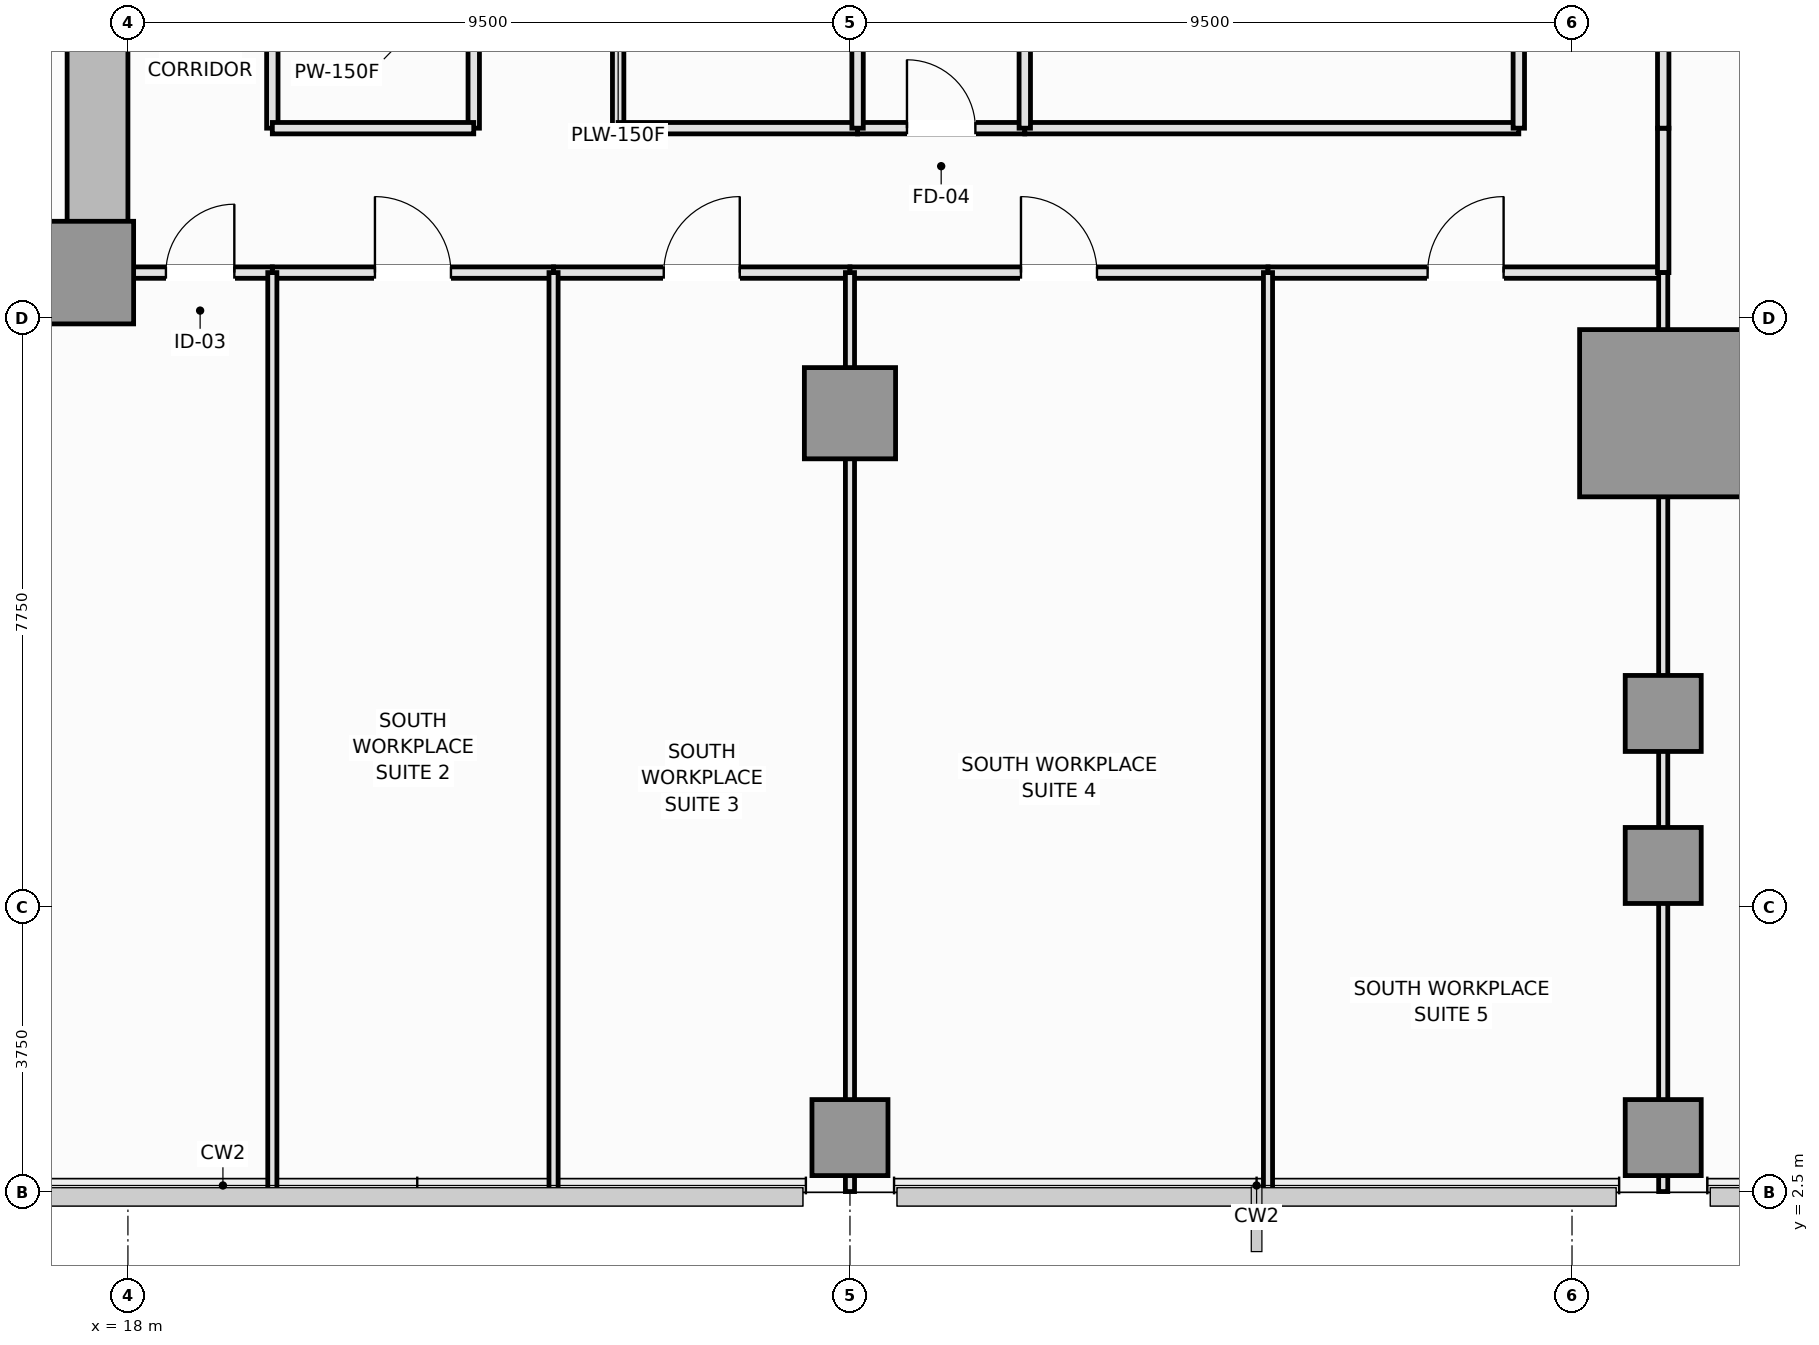
"""IFC4 building model, lengths in metres.
Left out: names, types, materials, properties, quantities, classifications, styles, units other than length and angle.
Written with IfcOpenShell. Run it as: python <this file> out.ifc"""

import sys

from ifc_helpers import new_model, si_unit, direction, frame, frame_2d, origin, origin_2d, place, context, subcontext, project, spatial, rectangle, extrude, element, fill, save


model = new_model("IFC4")
c1 = context("Model", 3, precision=1e-05, world=origin(), true_north=direction((0.0, 1.0)))
c2 = subcontext(c1, "Body", "Model", "MODEL_VIEW")
j1 = project(units=[si_unit("LENGTHUNIT", "METRE"), si_unit("PLANEANGLEUNIT", "RADIAN")], contexts=[c1])
p1 = place(None, origin())
s1 = spatial("IfcSite", under=j1, at=p1, CompositionType="ELEMENT")
p2 = place(p1, origin())
s2 = spatial("IfcBuilding", under=s1, at=p2, CompositionType="ELEMENT")
p3 = place(p2, frame((0.0, 0.0, 64.65)))
s3 = spatial("IfcBuildingStorey", under=s2, at=p3, CompositionType="ELEMENT", Elevation=64.65)
p4 = place(p3, frame((4.5, 14.4, 0.0), z_axis=(0.0, 0.0, 1.0), x_axis=(1.0, 0.0, 0.0)))
e1 = element("IfcWall", 1, at=p4, inside=s3, PredefinedType="SHEAR", context=c2, shape_type="SweptSolid", body=[
    extrude(rectangle(XDim=13.5, YDim=0.8, at=frame_2d((6.75, 0.0))), origin(), (0.0, 0.0, 1.0), 3.55),
])
p5 = place(p3, frame((17.6, 14.8, 0.0), z_axis=(0.0, 0.0, 1.0), x_axis=(0.0, 1.0, 0.0)))
e2 = element("IfcWall", 2, at=p5, inside=s3, PredefinedType="SHEAR", context=c2, shape_type="SweptSolid", body=[
    extrude(rectangle(XDim=8.65, YDim=0.8, at=frame_2d((4.325, 0.0))), origin(), (0.0, 0.0, 1.0), 3.55),
])
p6 = place(p5, frame((4.1, 0.0, 0.0)))
e3 = element("IfcOpeningElement", 3, at=p6, cuts=e2, PredefinedType="OPENING", context=c2, shape_type="SweptSolid", body=[
    extrude(rectangle(XDim=1.1, YDim=2.15, at=frame_2d((0.55, 1.075))), frame((0.0, 0.41, 0.0), z_axis=(0.0, -1.0, 0.0), x_axis=(1.0, 0.0, 0.0)), (0.0, 0.0, 1.0), 0.82),
])
p7 = place(p3, frame((17.4, 14.6, 0.0), z_axis=(0.0, 0.0, 1.0), x_axis=(1.0, 0.0, 0.0)))
e4 = element("IfcColumn", 4, at=p7, inside=s3, PredefinedType="PILASTER", context=c2, shape_type="SweptSolid", body=[
    extrude(rectangle(XDim=1.35, YDim=1.35, at=origin_2d()), origin(), (0.0, 0.0, 1.0), 3.55),
])
p8 = place(p3, frame((38.2, 12.75, 0.0), z_axis=(0.0, 0.0, 1.0), x_axis=(1.0, 0.0, 0.0)))
e5 = element("IfcColumn", 5, at=p8, inside=s3, PredefinedType="COLUMN", context=c2, shape_type="SweptSolid", body=[
    extrude(rectangle(XDim=2.2, YDim=2.2, at=origin_2d()), origin(), (0.0, 0.0, 1.0), 3.55),
])
p9 = place(p3, frame((27.5, 12.75, 0.0), z_axis=(0.0, 0.0, 1.0), x_axis=(1.0, 0.0, 0.0)))
e6 = element("IfcColumn", 6, at=p9, inside=s3, PredefinedType="COLUMN", context=c2, shape_type="SweptSolid", body=[
    extrude(rectangle(XDim=1.2, YDim=1.2, at=origin_2d()), origin(), (0.0, 0.0, 1.0), 3.55),
])
for number, where, z_axis, x_axis in (
    (7, (38.2, 6.8, 0.0), (0.0, 0.0, 1.0), (1.0, 0.0, 0.0)),
    (8, (38.2, 8.8, 0.0), (0.0, 0.0, 1.0), (1.0, 0.0, 0.0)),
    (9, (27.5, 3.22, 0.0), (0.0, 0.0, 1.0), (1.0, 0.0, 0.0)),
    (10, (38.2, 3.22, 0.0), (0.0, 0.0, 1.0), (1.0, 0.0, 0.0)),
):
    element("IfcColumn", number, at=place(p3, frame(where, z_axis=z_axis, x_axis=x_axis)), inside=s3, PredefinedType="COLUMN", context=c2, shape_type="SweptSolid", body=[
        extrude(rectangle(XDim=1.0, YDim=1.0, at=origin_2d()), origin(), (0.0, 0.0, 1.0), 3.55),
    ])
p10 = place(p3, frame((22.55, 16.5, 0.0), z_axis=(0.0, 0.0, 1.0), x_axis=(0.0, 1.0, 0.0)))
e11 = element("IfcWall", 11, at=p10, inside=s3, PredefinedType="PARTITIONING", context=c2, shape_type="SweptSolid", body=[
    extrude(rectangle(XDim=4.25, YDim=0.15, at=frame_2d((2.125, 0.0))), origin(), (0.0, 0.0, 1.0), 3.01),
])
p11 = place(p10, frame((1.625, 0.0, 0.0)))
e12 = element("IfcOpeningElement", 12, at=p11, cuts=e11, PredefinedType="OPENING", context=c2, shape_type="SweptSolid", body=[
    extrude(rectangle(XDim=1.0, YDim=2.15, at=frame_2d((0.5, 1.075))), frame((0.0, 0.085, 0.0), z_axis=(0.0, -1.0, 0.0), x_axis=(1.0, 0.0, 0.0)), (0.0, 0.0, 1.0), 0.17),
])
p12 = place(p3, frame((24.45, 16.5, 0.0), z_axis=(0.0, 0.0, 1.0), x_axis=(0.0, 1.0, 0.0)))
e13 = element("IfcWall", 13, at=p12, inside=s3, PredefinedType="PLUMBINGWALL", context=c2, shape_type="SweptSolid", body=[
    extrude(rectangle(XDim=3.1, YDim=0.15, at=frame_2d((1.55, 0.0))), origin(), (0.0, 0.0, 1.0), 3.37),
])
p13 = place(p12, frame((1.1, 0.0, 0.0)))
e14 = element("IfcOpeningElement", 14, at=p13, cuts=e13, PredefinedType="OPENING", context=c2, shape_type="SweptSolid", body=[
    extrude(rectangle(XDim=0.9, YDim=2.1, at=frame_2d((0.45, 1.05))), frame((0.0, 0.085, 0.0), z_axis=(0.0, -1.0, 0.0), x_axis=(1.0, 0.0, 0.0)), (0.0, 0.0, 1.0), 0.17),
])
p14 = place(p3, frame((19.9, 16.5, 0.0), z_axis=(0.0, 0.0, 1.0), x_axis=(0.0, 1.0, 0.0)))
e15 = element("IfcWall", 15, at=p14, inside=s3, PredefinedType="PARTITIONING", context=c2, shape_type="SweptSolid", body=[
    extrude(rectangle(XDim=4.25, YDim=0.15, at=frame_2d((2.125, 0.0))), origin(), (0.0, 0.0, 1.0), 3.37),
])
p15 = place(p3, frame((19.9, 16.5, 0.0), z_axis=(0.0, 0.0, 1.0), x_axis=(1.0, 0.0, 0.0)))
e16 = element("IfcWall", 16, at=p15, inside=s3, PredefinedType="PARTITIONING", context=c2, shape_type="SweptSolid", body=[
    extrude(rectangle(XDim=2.65, YDim=0.15, at=frame_2d((1.325, 0.0))), origin(), (0.0, 0.0, 1.0), 3.37),
])
p16 = place(p3, frame((24.45, 16.5, 0.0), z_axis=(0.0, 0.0, 1.0), x_axis=(1.0, 0.0, 0.0)))
e17 = element("IfcWall", 17, at=p16, inside=s3, PredefinedType="PLUMBINGWALL", context=c2, shape_type="SweptSolid", body=[
    extrude(rectangle(XDim=3.15, YDim=0.15, at=frame_2d((1.575, 0.0))), origin(), (0.0, 0.0, 1.0), 3.37),
])
p17 = place(p3, frame((27.6, 16.5, 0.0), z_axis=(0.0, 0.0, 1.0), x_axis=(1.0, 0.0, 0.0)))
e18 = element("IfcWall", 18, at=p17, inside=s3, PredefinedType="PLUMBINGWALL", context=c2, shape_type="SweptSolid", body=[
    extrude(rectangle(XDim=2.2, YDim=0.15, at=frame_2d((1.1, 0.0))), origin(), (0.0, 0.0, 1.0), 3.37),
])
p18 = place(p17, frame((0.65, 0.0, 0.0)))
e19 = element("IfcOpeningElement", 19, at=p18, cuts=e18, PredefinedType="OPENING", context=c2, shape_type="SweptSolid", body=[
    extrude(rectangle(XDim=0.9, YDim=2.1, at=frame_2d((0.45, 1.05))), frame((0.0, 0.085, 0.0), z_axis=(0.0, -1.0, 0.0), x_axis=(1.0, 0.0, 0.0)), (0.0, 0.0, 1.0), 0.17),
])
p19 = place(p3, frame((29.8, 16.5, 0.0), z_axis=(0.0, 0.0, 1.0), x_axis=(1.0, 0.0, 0.0)))
e20 = element("IfcWall", 20, at=p19, inside=s3, PredefinedType="PARTITIONING", context=c2, shape_type="SweptSolid", body=[
    extrude(rectangle(XDim=6.5, YDim=0.15, at=frame_2d((3.25, 0.0))), origin(), (0.0, 0.0, 1.0), 3.37),
])
p20 = place(p3, frame((18.0, 14.6, 0.0), z_axis=(0.0, 0.0, 1.0), x_axis=(1.0, 0.0, 0.0)))
e21 = element("IfcWall", 21, at=p20, inside=s3, PredefinedType="PARTITIONING", context=c2, shape_type="SweptSolid", body=[
    extrude(rectangle(XDim=1.9, YDim=0.15, at=frame_2d((0.95, 0.0))), origin(), (0.0, 0.0, 1.0), 3.37),
])
p21 = place(p20, frame((0.5, 0.0, 0.0)))
e22 = element("IfcOpeningElement", 22, at=p21, cuts=e21, PredefinedType="OPENING", context=c2, shape_type="SweptSolid", body=[
    extrude(rectangle(XDim=0.9, YDim=2.1, at=frame_2d((0.45, 1.05))), frame((0.0, 0.085, 0.0), z_axis=(0.0, -1.0, 0.0), x_axis=(1.0, 0.0, 0.0)), (0.0, 0.0, 1.0), 0.17),
])
p22 = place(p3, frame((19.9, 14.6, 0.0), z_axis=(0.0, 0.0, 1.0), x_axis=(1.0, 0.0, 0.0)))
e23 = element("IfcWall", 23, at=p22, inside=s3, PredefinedType="PARTITIONING", context=c2, shape_type="SweptSolid", body=[
    extrude(rectangle(XDim=3.7, YDim=0.15, at=frame_2d((1.85, 0.0))), origin(), (0.0, 0.0, 1.0), 3.37),
])
p23 = place(p22, frame((1.35, 0.0, 0.0)))
e24 = element("IfcOpeningElement", 24, at=p23, cuts=e23, PredefinedType="OPENING", context=c2, shape_type="SweptSolid", body=[
    extrude(rectangle(XDim=1.0, YDim=2.15, at=frame_2d((0.5, 1.075))), frame((0.0, 0.085, 0.0), z_axis=(0.0, -1.0, 0.0), x_axis=(1.0, 0.0, 0.0)), (0.0, 0.0, 1.0), 0.17),
])
p24 = place(p3, frame((23.6, 14.6, 0.0), z_axis=(0.0, 0.0, 1.0), x_axis=(1.0, 0.0, 0.0)))
e25 = element("IfcWall", 25, at=p24, inside=s3, PredefinedType="PARTITIONING", context=c2, shape_type="SweptSolid", body=[
    extrude(rectangle(XDim=3.9, YDim=0.15, at=frame_2d((1.95, 0.0))), origin(), (0.0, 0.0, 1.0), 3.37),
])
p25 = place(p24, frame((1.45, 0.0, 0.0)))
e26 = element("IfcOpeningElement", 26, at=p25, cuts=e25, PredefinedType="OPENING", context=c2, shape_type="SweptSolid", body=[
    extrude(rectangle(XDim=1.0, YDim=2.15, at=frame_2d((0.5, 1.075))), frame((0.0, 0.085, 0.0), z_axis=(0.0, -1.0, 0.0), x_axis=(1.0, 0.0, 0.0)), (0.0, 0.0, 1.0), 0.17),
])
p26 = place(p3, frame((27.5, 14.6, 0.0), z_axis=(0.0, 0.0, 1.0), x_axis=(1.0, 0.0, 0.0)))
e27 = element("IfcWall", 27, at=p26, inside=s3, PredefinedType="PARTITIONING", context=c2, shape_type="SweptSolid", body=[
    extrude(rectangle(XDim=5.5, YDim=0.15, at=frame_2d((2.75, 0.0))), origin(), (0.0, 0.0, 1.0), 3.37),
])
p27 = place(p26, frame((2.25, 0.0, 0.0)))
e28 = element("IfcOpeningElement", 28, at=p27, cuts=e27, PredefinedType="OPENING", context=c2, shape_type="SweptSolid", body=[
    extrude(rectangle(XDim=1.0, YDim=2.15, at=frame_2d((0.5, 1.075))), frame((0.0, 0.085, 0.0), z_axis=(0.0, -1.0, 0.0), x_axis=(1.0, 0.0, 0.0)), (0.0, 0.0, 1.0), 0.17),
])
p28 = place(p3, frame((33.0, 14.6, 0.0), z_axis=(0.0, 0.0, 1.0), x_axis=(1.0, 0.0, 0.0)))
e29 = element("IfcWall", 29, at=p28, inside=s3, PredefinedType="PARTITIONING", context=c2, shape_type="SweptSolid", body=[
    extrude(rectangle(XDim=5.2, YDim=0.15, at=frame_2d((2.6, 0.0))), origin(), (0.0, 0.0, 1.0), 3.37),
])
p29 = place(p28, frame((2.1, 0.0, 0.0)))
e30 = element("IfcOpeningElement", 30, at=p29, cuts=e29, PredefinedType="OPENING", context=c2, shape_type="SweptSolid", body=[
    extrude(rectangle(XDim=1.0, YDim=2.15, at=frame_2d((0.5, 1.075))), frame((0.0, 0.085, 0.0), z_axis=(0.0, -1.0, 0.0), x_axis=(1.0, 0.0, 0.0)), (0.0, 0.0, 1.0), 0.17),
])
p30 = place(p3, frame((38.2, 14.6, 0.0), z_axis=(0.0, 0.0, 1.0), x_axis=(0.0, 1.0, 0.0)))
e31 = element("IfcWall", 31, at=p30, inside=s3, PredefinedType="PARTITIONING", context=c2, shape_type="SweptSolid", body=[
    extrude(rectangle(XDim=1.9, YDim=0.15, at=frame_2d((0.95, 0.0))), origin(), (0.0, 0.0, 1.0), 2.82),
])
p31 = place(p3, frame((36.3, 16.5, 0.0), z_axis=(0.0, 0.0, 1.0), x_axis=(0.0, 1.0, 0.0)))
e32 = element("IfcWall", 32, at=p31, inside=s3, PredefinedType="PARTITIONING", context=c2, shape_type="SweptSolid", body=[
    extrude(rectangle(XDim=3.1, YDim=0.15, at=frame_2d((1.55, 0.0))), origin(), (0.0, 0.0, 1.0), 3.37),
])
p32 = place(p31, frame((1.485, 0.0, 0.0)))
e33 = element("IfcOpeningElement", 33, at=p32, cuts=e32, PredefinedType="OPENING", context=c2, shape_type="SweptSolid", body=[
    extrude(rectangle(XDim=1.0, YDim=2.15, at=frame_2d((0.5, 1.075))), frame((0.0, 0.085, 0.0), z_axis=(0.0, -1.0, 0.0), x_axis=(1.0, 0.0, 0.0)), (0.0, 0.0, 1.0), 0.17),
])
p33 = place(p3, frame((38.2, 16.5, 0.0), z_axis=(0.0, 0.0, 1.0), x_axis=(0.0, 1.0, 0.0)))
e34 = element("IfcWall", 34, at=p33, inside=s3, PredefinedType="PARTITIONING", context=c2, shape_type="SweptSolid", body=[
    extrude(rectangle(XDim=5.35, YDim=0.15, at=frame_2d((2.675, 0.0))), origin(), (0.0, 0.0, 1.0), 2.82),
])
p34 = place(p33, frame((2.988, 0.0, 0.0)))
e35 = element("IfcOpeningElement", 35, at=p34, cuts=e34, PredefinedType="OPENING", context=c2, shape_type="SweptSolid", body=[
    extrude(rectangle(XDim=1.0, YDim=2.15, at=frame_2d((0.5, 1.075))), frame((0.0, 0.085, 0.0), z_axis=(0.0, -1.0, 0.0), x_axis=(1.0, 0.0, 0.0)), (0.0, 0.0, 1.0), 0.17),
])
for number, where, z_axis, x_axis in (
    (36, (27.6, 16.5, 0.0), (0.0, 0.0, 1.0), (0.0, 1.0, 0.0)),
    (37, (29.8, 16.5, 0.0), (0.0, 0.0, 1.0), (0.0, 1.0, 0.0)),
):
    element("IfcWall", number, at=place(p3, frame(where, z_axis=z_axis, x_axis=x_axis)), inside=s3, PredefinedType="PLUMBINGWALL", context=c2, shape_type="SweptSolid", body=[
        extrude(rectangle(XDim=3.1, YDim=0.15, at=frame_2d((1.55, 0.0))), origin(), (0.0, 0.0, 1.0), 3.37),
    ])
for number, where, z_axis, x_axis in (
    (38, (19.9, 2.51, 0.0), (0.0, 0.0, 1.0), (0.0, 1.0, 0.0)),
    (39, (23.6, 2.51, 0.0), (0.0, 0.0, 1.0), (0.0, 1.0, 0.0)),
):
    element("IfcWall", number, at=place(p3, frame(where, z_axis=z_axis, x_axis=x_axis)), inside=s3, PredefinedType="PARTITIONING", context=c2, shape_type="SweptSolid", body=[
        extrude(rectangle(XDim=12.09, YDim=0.12, at=frame_2d((6.045, 0.0))), origin(), (0.0, 0.0, 1.0), 3.37),
    ])
p35 = place(p3, frame((27.5, 2.51, 0.0), z_axis=(0.0, 0.0, 1.0), x_axis=(0.0, 1.0, 0.0)))
e40 = element("IfcWall", 40, at=p35, inside=s3, PredefinedType="PARTITIONING", context=c2, shape_type="SweptSolid", body=[
    extrude(rectangle(XDim=12.09, YDim=0.12, at=frame_2d((6.045, 0.0))), origin(), (0.0, 0.0, 1.0), 2.82),
])
p36 = place(p3, frame((33.0, 2.51, 0.0), z_axis=(0.0, 0.0, 1.0), x_axis=(0.0, 1.0, 0.0)))
e41 = element("IfcWall", 41, at=p36, inside=s3, PredefinedType="PARTITIONING", context=c2, shape_type="SweptSolid", body=[
    extrude(rectangle(XDim=12.09, YDim=0.12, at=frame_2d((6.045, 0.0))), origin(), (0.0, 0.0, 1.0), 3.37),
])
p37 = place(p3, frame((38.2, 2.51, 0.0), z_axis=(0.0, 0.0, 1.0), x_axis=(0.0, 1.0, 0.0)))
e42 = element("IfcWall", 42, at=p37, inside=s3, PredefinedType="PARTITIONING", context=c2, shape_type="SweptSolid", body=[
    extrude(rectangle(XDim=12.09, YDim=0.12, at=frame_2d((6.045, 0.0))), origin(), (0.0, 0.0, 1.0), 2.82),
])
p38 = place(p18, origin())
e43 = element("IfcDoor", 43, at=p38, inside=s3, OperationType="SINGLE_SWING_LEFT", PredefinedType="DOOR", context=c2, shape_type="SweptSolid", body=[
    extrude(rectangle(XDim=0.9, YDim=2.1, at=frame_2d((0.45, 1.05))), frame((0.0, 0.025, 0.0), z_axis=(0.0, -1.0, 0.0), x_axis=(1.0, 0.0, 0.0)), (0.0, 0.0, 1.0), 0.05),
])
fill(e19, e43)
p39 = place(p21, origin())
e44 = element("IfcDoor", 44, at=p39, inside=s3, OperationType="SINGLE_SWING_RIGHT", PredefinedType="DOOR", context=c2, shape_type="SweptSolid", body=[
    extrude(rectangle(XDim=0.9, YDim=2.1, at=frame_2d((0.45, 1.05))), frame((0.0, 0.025, 0.0), z_axis=(0.0, -1.0, 0.0), x_axis=(1.0, 0.0, 0.0)), (0.0, 0.0, 1.0), 0.05),
])
fill(e22, e44)
p40 = place(p23, origin())
e45 = element("IfcDoor", 45, at=p40, inside=s3, OperationType="SINGLE_SWING_LEFT", PredefinedType="DOOR", context=c2, shape_type="SweptSolid", body=[
    extrude(rectangle(XDim=1.0, YDim=2.15, at=frame_2d((0.5, 1.075))), frame((0.0, 0.025, 0.0), z_axis=(0.0, -1.0, 0.0), x_axis=(1.0, 0.0, 0.0)), (0.0, 0.0, 1.0), 0.05),
])
fill(e24, e45)
p41 = place(p25, origin())
e46 = element("IfcDoor", 46, at=p41, inside=s3, OperationType="SINGLE_SWING_RIGHT", PredefinedType="DOOR", context=c2, shape_type="SweptSolid", body=[
    extrude(rectangle(XDim=1.0, YDim=2.15, at=frame_2d((0.5, 1.075))), frame((0.0, 0.025, 0.0), z_axis=(0.0, -1.0, 0.0), x_axis=(1.0, 0.0, 0.0)), (0.0, 0.0, 1.0), 0.05),
])
fill(e26, e46)
p42 = place(p27, origin())
e47 = element("IfcDoor", 47, at=p42, inside=s3, OperationType="SINGLE_SWING_LEFT", PredefinedType="DOOR", context=c2, shape_type="SweptSolid", body=[
    extrude(rectangle(XDim=1.0, YDim=2.15, at=frame_2d((0.5, 1.075))), frame((0.0, 0.025, 0.0), z_axis=(0.0, -1.0, 0.0), x_axis=(1.0, 0.0, 0.0)), (0.0, 0.0, 1.0), 0.05),
])
fill(e28, e47)
p43 = place(p29, origin())
e48 = element("IfcDoor", 48, at=p43, inside=s3, OperationType="SINGLE_SWING_RIGHT", PredefinedType="DOOR", context=c2, shape_type="SweptSolid", body=[
    extrude(rectangle(XDim=1.0, YDim=2.15, at=frame_2d((0.5, 1.075))), frame((0.0, 0.025, 0.0), z_axis=(0.0, -1.0, 0.0), x_axis=(1.0, 0.0, 0.0)), (0.0, 0.0, 1.0), 0.05),
])
fill(e30, e48)
save(model, sys.argv[1])
